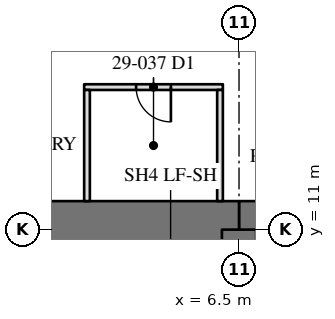
"""IFC4 building model, lengths in metres.
Left out: names, types, materials, properties, quantities, classifications, styles, units other than length and angle.
Written with IfcOpenShell. Run it as: python <this file> out.ifc"""

import sys

from ifc_helpers import new_model, si_unit, direction, frame, frame_2d, origin, place, context, subcontext, project, spatial, rectangle, extrude, element, fill, save


model = new_model("IFC4")
c1 = context("Model", 3, precision=1e-05, world=origin(), true_north=direction((0.0, 1.0)))
c2 = subcontext(c1, "Body", "Model", "MODEL_VIEW")
j1 = project(units=[si_unit("LENGTHUNIT", "METRE"), si_unit("PLANEANGLEUNIT", "RADIAN")], contexts=[c1])
p1 = place(None, origin())
s1 = spatial("IfcSite", under=j1, at=p1, CompositionType="ELEMENT")
p2 = place(p1, origin())
s2 = spatial("IfcBuilding", under=s1, at=p2, CompositionType="ELEMENT")
p3 = place(p2, frame((0.0, 0.0, 125.4)))
s3 = spatial("IfcBuildingStorey", under=s2, at=p3, CompositionType="ELEMENT", Elevation=125.4)
p4 = place(p3, frame((11.0, 11.0, 0.0), z_axis=(0.0, 0.0, 1.0), x_axis=(-1.0, 0.0, 0.0)))
e1 = element("IfcWall", 1, at=p4, inside=s3, PredefinedType="SHEAR", context=c2, shape_type="SweptSolid", body=[
    extrude(rectangle(XDim=4.5, YDim=1.5, at=frame_2d((2.25, 0.0))), origin(), (0.0, 0.0, 1.0), 4.1),
])
p5 = place(p3, frame((6.5, 11.0, 0.0), z_axis=(0.0, 0.0, 1.0), x_axis=(-1.0, 0.0, 0.0)))
e2 = element("IfcWall", 2, at=p5, inside=s3, PredefinedType="SHEAR", context=c2, shape_type="SweptSolid", body=[
    extrude(rectangle(XDim=13.0, YDim=1.5, at=frame_2d((6.5, 0.0))), origin(), (0.0, 0.0, 1.0), 4.1),
])
p6 = place(p3, frame((6.5, 6.5, 0.0), z_axis=(0.0, 0.0, 1.0), x_axis=(0.0, 1.0, 0.0)))
e3 = element("IfcWall", 3, at=p6, inside=s3, PredefinedType="SHEAR", context=c2, shape_type="SweptSolid", body=[
    extrude(rectangle(XDim=4.5, YDim=0.9, at=frame_2d((2.25, 0.0))), origin(), (0.0, 0.0, 1.0), 4.1),
])
p7 = place(p3, frame((6.075, 14.75, 0.0), z_axis=(0.0, 0.0, 1.0), x_axis=(-1.0, 0.0, 0.0)))
e4 = element("IfcWall", 4, at=p7, inside=s3, PredefinedType="PARTITIONING", context=c2, shape_type="SweptSolid", body=[
    extrude(rectangle(XDim=3.65, YDim=0.15, at=frame_2d((1.825, 0.0))), origin(), (0.0, 0.0, 1.0), 3.91),
])
p8 = place(p7, frame((1.367, 0.0, 0.0)))
e5 = element("IfcOpeningElement", 5, at=p8, cuts=e4, PredefinedType="OPENING", context=c2, shape_type="SweptSolid", body=[
    extrude(rectangle(XDim=0.915, YDim=2.134, at=frame_2d((0.458, 1.067))), frame((0.0, 0.085, 0.0), z_axis=(0.0, -1.0, 0.0), x_axis=(1.0, 0.0, 0.0)), (0.0, 0.0, 1.0), 0.17),
])
for number, where, z_axis, x_axis in (
    (6, (6.0, 14.675, 0.0), (0.0, 0.0, 1.0), (0.0, -1.0, 0.0)),
    (7, (2.5, 14.675, 0.0), (0.0, 0.0, 1.0), (0.0, -1.0, 0.0)),
):
    element("IfcWall", number, at=place(p3, frame(where, z_axis=z_axis, x_axis=x_axis)), inside=s3, PredefinedType="PARTITIONING", context=c2, shape_type="SweptSolid", body=[
        extrude(rectangle(XDim=2.925, YDim=0.15, at=frame_2d((1.462, 0.0))), origin(), (0.0, 0.0, 1.0), 3.91),
    ])
p9 = place(p8, origin())
e8 = element("IfcDoor", 8, at=p9, inside=s3, OperationType="SINGLE_SWING_LEFT", PredefinedType="DOOR", context=c2, shape_type="SweptSolid", body=[
    extrude(rectangle(XDim=0.915, YDim=2.134, at=frame_2d((0.458, 1.067))), frame((0.0, 0.025, 0.0), z_axis=(0.0, -1.0, 0.0), x_axis=(1.0, 0.0, 0.0)), (0.0, 0.0, 1.0), 0.05),
])
fill(e5, e8)
save(model, sys.argv[1])
